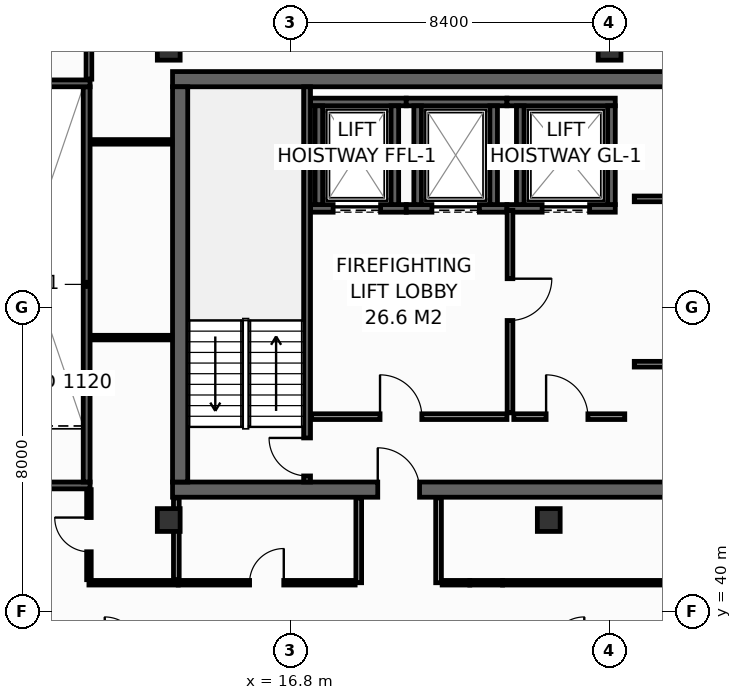
"""IFC4 building model, lengths in metres.
Left out: names, types, materials, properties, quantities, classifications, styles, units other than length and angle.
Written with IfcOpenShell. Run it as: python <this file> out.ifc"""

import sys

from ifc_helpers import new_model, si_unit, direction, frame, frame_2d, origin, origin_2d, place, context, subcontext, project, spatial, rectangle, hollow_rectangle, extrude, element, fill, save


model = new_model("IFC4")
c1 = context("Model", 3, precision=1e-05, world=origin(), true_north=direction((0.0, 1.0)))
c2 = subcontext(c1, "Body", "Model", "MODEL_VIEW")
j1 = project(units=[si_unit("LENGTHUNIT", "METRE"), si_unit("PLANEANGLEUNIT", "RADIAN")], contexts=[c1])
p1 = place(None, origin())
s1 = spatial("IfcSite", under=j1, at=p1, CompositionType="ELEMENT")
p2 = place(p1, origin())
s2 = spatial("IfcBuilding", under=s1, at=p2, CompositionType="ELEMENT")
p3 = place(p2, frame((0.0, 0.0, 272.4)))
s3 = spatial("IfcBuildingStorey", under=s2, at=p3, CompositionType="ELEMENT", Elevation=272.4)
p4 = place(p3, frame((13.7, 43.2, 0.0), z_axis=(0.0, 0.0, 1.0), x_axis=(1.0, 0.0, 0.0)))
e1 = element("IfcWall", 1, at=p4, inside=s3, PredefinedType="SHEAR", context=c2, shape_type="SweptSolid", body=[
    extrude(rectangle(XDim=32.5, YDim=0.4, at=frame_2d((16.25, 0.0))), origin(), (0.0, 0.0, 1.0), 3.35),
])
p5 = place(p4, frame((5.4, 0.0, 0.0)))
e2 = element("IfcOpeningElement", 2, at=p5, cuts=e1, PredefinedType="OPENING", context=c2, shape_type="SweptSolid", body=[
    extrude(rectangle(XDim=1.1, YDim=2.15, at=frame_2d((0.55, 1.075))), frame((0.0, 0.21, 0.0), z_axis=(0.0, -1.0, 0.0), x_axis=(1.0, 0.0, 0.0)), (0.0, 0.0, 1.0), 0.42),
])
p6 = place(p4, frame((25.6, 0.0, 0.0)))
e3 = element("IfcOpeningElement", 3, at=p6, cuts=e1, PredefinedType="OPENING", context=c2, shape_type="SweptSolid", body=[
    extrude(rectangle(XDim=1.1, YDim=2.15, at=frame_2d((0.55, 1.075))), frame((0.0, 0.21, 0.0), z_axis=(0.0, -1.0, 0.0), x_axis=(1.0, 0.0, 0.0)), (0.0, 0.0, 1.0), 0.42),
])
p7 = place(p3, frame((13.7, 54.0, 0.0), z_axis=(0.0, 0.0, 1.0), x_axis=(1.0, 0.0, 0.0)))
e4 = element("IfcWall", 4, at=p7, inside=s3, PredefinedType="SHEAR", context=c2, shape_type="SweptSolid", body=[
    extrude(rectangle(XDim=32.5, YDim=0.4, at=frame_2d((16.25, 0.0))), origin(), (0.0, 0.0, 1.0), 3.35),
])
p8 = place(p3, frame((13.9, 43.4, 0.0), z_axis=(0.0, 0.0, 1.0), x_axis=(0.0, 1.0, 0.0)))
e5 = element("IfcWall", 5, at=p8, inside=s3, PredefinedType="SHEAR", context=c2, shape_type="SweptSolid", body=[
    extrude(rectangle(XDim=10.4, YDim=0.4, at=frame_2d((5.2, 0.0))), origin(), (0.0, 0.0, 1.0), 3.35),
])
for number, where, z_axis, x_axis in (
    (6, (13.6, 54.8, 0.0), (0.0, 0.0, 1.0), (1.0, 0.0, 0.0)),
    (7, (25.2, 54.8, 0.0), (0.0, 0.0, 1.0), (1.0, 0.0, 0.0)),
    (8, (13.6, 42.4, 0.0), (0.0, 0.0, 1.0), (1.0, 0.0, 0.0)),
    (9, (23.6, 42.4, 0.0), (0.0, 0.0, 1.0), (1.0, 0.0, 0.0)),
):
    element("IfcColumn", number, at=place(p3, frame(where, z_axis=z_axis, x_axis=x_axis)), inside=s3, PredefinedType="COLUMN", context=c2, shape_type="SweptSolid", body=[
        extrude(hollow_rectangle(XDim=0.6, YDim=0.6, WallThickness=0.028, at=origin_2d()), origin(), (0.0, 0.0, 1.0), 3.8),
    ])
p9 = place(p3, frame((17.33, 50.6, 0.0), z_axis=(0.0, 0.0, 1.0), x_axis=(1.0, 0.0, 0.0)))
e10 = element("IfcWall", 10, at=p9, inside=s3, PredefinedType="SHEAR", context=c2, shape_type="SweptSolid", body=[
    extrude(rectangle(XDim=2.52, YDim=0.2, at=frame_2d((1.26, 0.0))), origin(), (0.0, 0.0, 1.0), 3.35),
])
p10 = place(p9, frame((0.595, 0.0, 0.0)))
e11 = element("IfcOpeningElement", 11, at=p10, cuts=e10, PredefinedType="OPENING", context=c2, shape_type="SweptSolid", body=[
    extrude(rectangle(XDim=1.25, YDim=2.3, at=frame_2d((0.625, 1.15))), frame((0.0, 0.11, 0.0), z_axis=(0.0, -1.0, 0.0), x_axis=(1.0, 0.0, 0.0)), (0.0, 0.0, 1.0), 0.22),
])
p11 = place(p3, frame((17.33, 53.4, 0.0), z_axis=(0.0, 0.0, 1.0), x_axis=(1.0, 0.0, 0.0)))
e12 = element("IfcWall", 12, at=p11, inside=s3, PredefinedType="SHEAR", context=c2, shape_type="SweptSolid", body=[
    extrude(rectangle(XDim=2.52, YDim=0.2, at=frame_2d((1.26, 0.0))), origin(), (0.0, 0.0, 1.0), 3.35),
])
for number, where, z_axis, x_axis in (
    (13, (17.55, 50.7, 0.0), (0.0, 0.0, 1.0), (0.0, 1.0, 0.0)),
    (14, (19.55, 50.7, 0.0), (0.0, 0.0, 1.0), (0.0, 1.0, 0.0)),
):
    element("IfcWall", number, at=place(p3, frame(where, z_axis=z_axis, x_axis=x_axis)), inside=s3, PredefinedType="SHEAR", context=c2, shape_type="SweptSolid", body=[
        extrude(rectangle(XDim=2.6, YDim=0.2, at=frame_2d((1.3, 0.0))), origin(), (0.0, 0.0, 1.0), 3.35),
    ])
p12 = place(p3, frame((19.85, 50.6, 0.0), z_axis=(0.0, 0.0, 1.0), x_axis=(1.0, 0.0, 0.0)))
e15 = element("IfcWall", 15, at=p12, inside=s3, PredefinedType="SHEAR", context=c2, shape_type="SweptSolid", body=[
    extrude(rectangle(XDim=2.65, YDim=0.2, at=frame_2d((1.325, 0.0))), origin(), (0.0, 0.0, 1.0), 3.35),
])
p13 = place(p12, frame((0.675, 0.0, 0.0)))
e16 = element("IfcOpeningElement", 16, at=p13, cuts=e15, PredefinedType="OPENING", context=c2, shape_type="SweptSolid", body=[
    extrude(rectangle(XDim=1.25, YDim=2.3, at=frame_2d((0.625, 1.15))), frame((0.0, 0.11, 0.0), z_axis=(0.0, -1.0, 0.0), x_axis=(1.0, 0.0, 0.0)), (0.0, 0.0, 1.0), 0.22),
])
p14 = place(p3, frame((19.85, 53.4, 0.0), z_axis=(0.0, 0.0, 1.0), x_axis=(1.0, 0.0, 0.0)))
e17 = element("IfcWall", 17, at=p14, inside=s3, PredefinedType="SHEAR", context=c2, shape_type="SweptSolid", body=[
    extrude(rectangle(XDim=2.65, YDim=0.2, at=frame_2d((1.325, 0.0))), origin(), (0.0, 0.0, 1.0), 3.35),
])
for number, where, z_axis, x_axis in (
    (18, (20.15, 50.7, 0.0), (0.0, 0.0, 1.0), (0.0, 1.0, 0.0)),
    (19, (22.15, 50.7, 0.0), (0.0, 0.0, 1.0), (0.0, 1.0, 0.0)),
):
    element("IfcWall", number, at=place(p3, frame(where, z_axis=z_axis, x_axis=x_axis)), inside=s3, PredefinedType="SHEAR", context=c2, shape_type="SweptSolid", body=[
        extrude(rectangle(XDim=2.6, YDim=0.2, at=frame_2d((1.3, 0.0))), origin(), (0.0, 0.0, 1.0), 3.35),
    ])
p15 = place(p3, frame((22.5, 50.6, 0.0), z_axis=(0.0, 0.0, 1.0), x_axis=(1.0, 0.0, 0.0)))
e20 = element("IfcWall", 20, at=p15, inside=s3, PredefinedType="SHEAR", context=c2, shape_type="SweptSolid", body=[
    extrude(rectangle(XDim=2.85, YDim=0.2, at=frame_2d((1.425, 0.0))), origin(), (0.0, 0.0, 1.0), 3.35),
])
p16 = place(p15, frame((0.925, 0.0, 0.0)))
e21 = element("IfcOpeningElement", 21, at=p16, cuts=e20, PredefinedType="OPENING", context=c2, shape_type="SweptSolid", body=[
    extrude(rectangle(XDim=1.25, YDim=2.3, at=frame_2d((0.625, 1.15))), frame((0.0, 0.11, 0.0), z_axis=(0.0, -1.0, 0.0), x_axis=(1.0, 0.0, 0.0)), (0.0, 0.0, 1.0), 0.22),
])
p17 = place(p3, frame((22.5, 53.4, 0.0), z_axis=(0.0, 0.0, 1.0), x_axis=(1.0, 0.0, 0.0)))
e22 = element("IfcWall", 22, at=p17, inside=s3, PredefinedType="SHEAR", context=c2, shape_type="SweptSolid", body=[
    extrude(rectangle(XDim=2.85, YDim=0.2, at=frame_2d((1.425, 0.0))), origin(), (0.0, 0.0, 1.0), 3.35),
])
for number, where, z_axis, x_axis in (
    (23, (22.85, 50.7, 0.0), (0.0, 0.0, 1.0), (0.0, 1.0, 0.0)),
    (24, (25.25, 50.7, 0.0), (0.0, 0.0, 1.0), (0.0, 1.0, 0.0)),
):
    element("IfcWall", number, at=place(p3, frame(where, z_axis=z_axis, x_axis=x_axis)), inside=s3, PredefinedType="SHEAR", context=c2, shape_type="SweptSolid", body=[
        extrude(rectangle(XDim=2.6, YDim=0.2, at=frame_2d((1.3, 0.0))), origin(), (0.0, 0.0, 1.0), 3.35),
    ])
p18 = place(p3, frame((17.24, 43.4, 0.0), z_axis=(0.0, 0.0, 1.0), x_axis=(0.0, 1.0, 0.0)))
e25 = element("IfcWall", 25, at=p18, inside=s3, PredefinedType="SHEAR", context=c2, shape_type="SweptSolid", body=[
    extrude(rectangle(XDim=10.4, YDim=0.18, at=frame_2d((5.2, 0.0))), origin(), (0.0, 0.0, 1.0), 3.35),
])
p19 = place(p18, frame((0.16, 0.0, 0.0)))
e26 = element("IfcOpeningElement", 26, at=p19, cuts=e25, PredefinedType="OPENING", context=c2, shape_type="SweptSolid", body=[
    extrude(rectangle(XDim=1.0, YDim=2.15, at=frame_2d((0.5, 1.075))), frame((0.0, 0.1, 0.0), z_axis=(0.0, -1.0, 0.0), x_axis=(1.0, 0.0, 0.0)), (0.0, 0.0, 1.0), 0.2),
])
p20 = place(p3, frame((8.12, 43.31, 0.0), z_axis=(0.0, 0.0, 1.0), x_axis=(1.0, 0.0, 0.0)))
e27 = element("IfcWall", 27, at=p20, inside=s3, PredefinedType="SHEAR", context=c2, shape_type="SweptSolid", body=[
    extrude(rectangle(XDim=3.41, YDim=0.18, at=frame_2d((1.705, 0.0))), origin(), (0.0, 0.0, 1.0), 3.35),
])
p21 = place(p20, frame((1.15, 0.0, 0.0)))
e28 = element("IfcOpeningElement", 28, at=p21, cuts=e27, PredefinedType="OPENING", context=c2, shape_type="SweptSolid", body=[
    extrude(rectangle(XDim=1.1, YDim=2.15, at=frame_2d((0.55, 1.075))), frame((0.0, 0.1, 0.0), z_axis=(0.0, -1.0, 0.0), x_axis=(1.0, 0.0, 0.0)), (0.0, 0.0, 1.0), 0.2),
])
p22 = place(p3, frame((11.44, 43.4, 0.0), z_axis=(0.0, 0.0, 1.0), x_axis=(0.0, 1.0, 0.0)))
e29 = element("IfcWall", 29, at=p22, inside=s3, PredefinedType="SHEAR", context=c2, shape_type="SweptSolid", body=[
    extrude(rectangle(XDim=10.4, YDim=0.18, at=frame_2d((5.2, 0.0))), origin(), (0.0, 0.0, 1.0), 3.35),
])
p23 = place(p3, frame((11.53, 53.89, 0.0), z_axis=(0.0, 0.0, 1.0), x_axis=(-1.0, 0.0, 0.0)))
e30 = element("IfcWall", 30, at=p23, inside=s3, PredefinedType="SHEAR", context=c2, shape_type="SweptSolid", body=[
    extrude(rectangle(XDim=3.41, YDim=0.18, at=frame_2d((1.705, 0.0))), origin(), (0.0, 0.0, 1.0), 3.35),
])
p24 = place(p3, frame((17.36, 45.12, 0.0), z_axis=(0.0, 0.0, 1.0), x_axis=(1.0, 0.0, 0.0)))
e31 = element("IfcWall", 31, at=p24, inside=s3, PredefinedType="PARTITIONING", context=c2, shape_type="SweptSolid", body=[
    extrude(rectangle(XDim=5.14, YDim=0.15, at=frame_2d((2.57, 0.0))), origin(), (0.0, 0.0, 1.0), 3.35),
])
p25 = place(p24, frame((1.8, 0.0, 0.0)))
e32 = element("IfcOpeningElement", 32, at=p25, cuts=e31, PredefinedType="OPENING", context=c2, shape_type="SweptSolid", body=[
    extrude(rectangle(XDim=1.1, YDim=2.15, at=frame_2d((0.55, 1.075))), frame((0.0, 0.085, 0.0), z_axis=(0.0, -1.0, 0.0), x_axis=(1.0, 0.0, 0.0)), (0.0, 0.0, 1.0), 0.17),
])
p26 = place(p3, frame((22.58, 50.55, 0.0), z_axis=(0.0, 0.0, 1.0), x_axis=(0.0, -1.0, 0.0)))
e33 = element("IfcWall", 33, at=p26, inside=s3, PredefinedType="PARTITIONING", context=c2, shape_type="SweptSolid", body=[
    extrude(rectangle(XDim=5.33, YDim=0.15, at=frame_2d((2.665, 0.0))), origin(), (0.0, 0.0, 1.0), 3.35),
])
p27 = place(p26, frame((1.8, 0.0, 0.0)))
e34 = element("IfcOpeningElement", 34, at=p27, cuts=e33, PredefinedType="OPENING", context=c2, shape_type="SweptSolid", body=[
    extrude(rectangle(XDim=1.1, YDim=2.15, at=frame_2d((0.55, 1.075))), frame((0.0, 0.085, 0.0), z_axis=(0.0, -1.0, 0.0), x_axis=(1.0, 0.0, 0.0)), (0.0, 0.0, 1.0), 0.17),
])
p28 = place(p3, frame((22.68, 45.12, 0.0), z_axis=(0.0, 0.0, 1.0), x_axis=(1.0, 0.0, 0.0)))
e35 = element("IfcWall", 35, at=p28, inside=s3, PredefinedType="PARTITIONING", context=c2, shape_type="SweptSolid", body=[
    extrude(rectangle(XDim=2.92, YDim=0.15, at=frame_2d((1.46, 0.0))), origin(), (0.0, 0.0, 1.0), 3.35),
])
p29 = place(p28, frame((0.85, 0.0, 0.0)))
e36 = element("IfcOpeningElement", 36, at=p29, cuts=e35, PredefinedType="OPENING", context=c2, shape_type="SweptSolid", body=[
    extrude(rectangle(XDim=1.1, YDim=2.15, at=frame_2d((0.55, 1.075))), frame((0.0, 0.085, 0.0), z_axis=(0.0, -1.0, 0.0), x_axis=(1.0, 0.0, 0.0)), (0.0, 0.0, 1.0), 0.17),
])
p30 = place(p3, frame((25.85, 50.85, 0.0), z_axis=(0.0, 0.0, 1.0), x_axis=(1.0, 0.0, 0.0)))
e37 = element("IfcWall", 37, at=p30, inside=s3, PredefinedType="PARTITIONING", context=c2, shape_type="SweptSolid", body=[
    extrude(rectangle(XDim=7.65, YDim=0.15, at=frame_2d((3.825, 0.0))), origin(), (0.0, 0.0, 1.0), 3.35),
])
p31 = place(p30, frame((1.25, 0.0, 0.0)))
e38 = element("IfcOpeningElement", 38, at=p31, cuts=e37, PredefinedType="OPENING", context=c2, shape_type="SweptSolid", body=[
    extrude(rectangle(XDim=0.95, YDim=2.15, at=frame_2d((0.475, 1.075))), frame((0.0, 0.085, 0.0), z_axis=(0.0, -1.0, 0.0), x_axis=(1.0, 0.0, 0.0)), (0.0, 0.0, 1.0), 0.17),
])
p32 = place(p30, frame((5.05, 0.0, 0.0)))
e39 = element("IfcOpeningElement", 39, at=p32, cuts=e37, PredefinedType="OPENING", context=c2, shape_type="SweptSolid", body=[
    extrude(rectangle(XDim=0.95, YDim=2.15, at=frame_2d((0.475, 1.075))), frame((0.0, 0.085, 0.0), z_axis=(0.0, -1.0, 0.0), x_axis=(1.0, 0.0, 0.0)), (0.0, 0.0, 1.0), 0.17),
])
p33 = place(p3, frame((25.85, 46.5, 0.0), z_axis=(0.0, 0.0, 1.0), x_axis=(1.0, 0.0, 0.0)))
e40 = element("IfcWall", 40, at=p33, inside=s3, PredefinedType="PARTITIONING", context=c2, shape_type="SweptSolid", body=[
    extrude(rectangle(XDim=7.65, YDim=0.15, at=frame_2d((3.825, 0.0))), origin(), (0.0, 0.0, 1.0), 3.35),
])
p34 = place(p33, frame((2.8, 0.0, 0.0)))
e41 = element("IfcOpeningElement", 41, at=p34, cuts=e40, PredefinedType="OPENING", context=c2, shape_type="SweptSolid", body=[
    extrude(rectangle(XDim=0.95, YDim=2.15, at=frame_2d((0.475, 1.075))), frame((0.0, 0.085, 0.0), z_axis=(0.0, -1.0, 0.0), x_axis=(1.0, 0.0, 0.0)), (0.0, 0.0, 1.0), 0.17),
])
p35 = place(p3, frame((11.5, 40.75, 0.0), z_axis=(0.0, 0.0, 1.0), x_axis=(1.0, 0.0, 0.0)))
e42 = element("IfcWall", 42, at=p35, inside=s3, PredefinedType="PARTITIONING", context=c2, shape_type="SweptSolid", body=[
    extrude(rectangle(XDim=2.35, YDim=0.12, at=frame_2d((1.175, 0.0))), origin(), (0.0, 0.0, 1.0), 3.35),
])
p36 = place(p3, frame((11.55, 52.35, 0.0), z_axis=(0.0, 0.0, 1.0), x_axis=(1.0, 0.0, 0.0)))
e43 = element("IfcWall", 43, at=p36, inside=s3, PredefinedType="PARTITIONING", context=c2, shape_type="SweptSolid", body=[
    extrude(rectangle(XDim=2.13, YDim=0.12, at=frame_2d((1.065, 0.0))), origin(), (0.0, 0.0, 1.0), 3.35),
])
p37 = place(p3, frame((11.5, 54.0, 0.0), z_axis=(0.0, 0.0, 1.0), x_axis=(0.0, 1.0, 0.0)))
e44 = element("IfcWall", 44, at=p37, inside=s3, PredefinedType="PARTITIONING", context=c2, shape_type="SweptSolid", body=[
    extrude(rectangle(XDim=1.995, YDim=0.15, at=frame_2d((0.998, 0.0))), origin(), (0.0, 0.0, 1.0), 2.735),
])
p38 = place(p3, frame((11.55, 47.2, 0.0), z_axis=(0.0, 0.0, 1.0), x_axis=(1.0, 0.0, 0.0)))
e45 = element("IfcWall", 45, at=p38, inside=s3, PredefinedType="PARTITIONING", context=c2, shape_type="SweptSolid", body=[
    extrude(rectangle(XDim=2.13, YDim=0.12, at=frame_2d((1.065, 0.0))), origin(), (0.0, 0.0, 1.0), 3.35),
])
p39 = place(p3, frame((11.5, 40.83, 0.0), z_axis=(0.0, 0.0, 1.0), x_axis=(0.0, 1.0, 0.0)))
e46 = element("IfcWall", 46, at=p39, inside=s3, PredefinedType="PARTITIONING", context=c2, shape_type="SweptSolid", body=[
    extrude(rectangle(XDim=2.37, YDim=0.12, at=frame_2d((1.185, 0.0))), origin(), (0.0, 0.0, 1.0), 2.747),
])
p40 = place(p39, frame((0.735, 0.0, 0.0)))
e47 = element("IfcOpeningElement", 47, at=p40, cuts=e46, PredefinedType="OPENING", context=c2, shape_type="SweptSolid", body=[
    extrude(rectangle(XDim=0.9, YDim=2.1, at=frame_2d((0.45, 1.05))), frame((0.0, 0.07, 0.0), z_axis=(0.0, -1.0, 0.0), x_axis=(1.0, 0.0, 0.0)), (0.0, 0.0, 1.0), 0.14),
])
p41 = place(p3, frame((13.8, 40.83, 0.0), z_axis=(0.0, 0.0, 1.0), x_axis=(0.0, 1.0, 0.0)))
e48 = element("IfcWall", 48, at=p41, inside=s3, PredefinedType="PARTITIONING", context=c2, shape_type="SweptSolid", body=[
    extrude(rectangle(XDim=2.15, YDim=0.15, at=frame_2d((1.075, 0.0))), origin(), (0.0, 0.0, 1.0), 3.35),
])
for number, where, z_axis, x_axis in (
    (49, (18.6, 40.75, 0.0), (0.0, 0.0, 1.0), (0.0, 1.0, 0.0)),
    (50, (20.7, 40.75, 0.0), (0.0, 0.0, 1.0), (0.0, 1.0, 0.0)),
):
    element("IfcWall", number, at=place(p3, frame(where, z_axis=z_axis, x_axis=x_axis)), inside=s3, PredefinedType="PARTITIONING", context=c2, shape_type="SweptSolid", body=[
        extrude(rectangle(XDim=2.23, YDim=0.15, at=frame_2d((1.115, 0.0))), origin(), (0.0, 0.0, 1.0), 3.35),
    ])
p42 = place(p3, frame((13.85, 40.75, 0.0), z_axis=(0.0, 0.0, 1.0), x_axis=(1.0, 0.0, 0.0)))
e51 = element("IfcWall", 51, at=p42, inside=s3, PredefinedType="PARTITIONING", context=c2, shape_type="SweptSolid", body=[
    extrude(rectangle(XDim=4.655, YDim=0.12, at=frame_2d((2.327, 0.0))), origin(), (0.0, 0.0, 1.0), 3.35),
])
p43 = place(p42, frame((1.877, 0.0, 0.0)))
e52 = element("IfcOpeningElement", 52, at=p43, cuts=e51, PredefinedType="OPENING", context=c2, shape_type="SweptSolid", body=[
    extrude(rectangle(XDim=0.9, YDim=2.1, at=frame_2d((0.45, 1.05))), frame((0.0, 0.07, 0.0), z_axis=(0.0, -1.0, 0.0), x_axis=(1.0, 0.0, 0.0)), (0.0, 0.0, 1.0), 0.14),
])
p44 = place(p3, frame((22.384, 40.75, 0.0), z_axis=(0.0, 0.0, 1.0), x_axis=(1.0, 0.0, 0.0)))
e53 = element("IfcWall", 53, at=p44, inside=s3, PredefinedType="PARTITIONING", context=c2, shape_type="SweptSolid", body=[
    extrude(rectangle(XDim=15.232, YDim=0.12, at=frame_2d((7.616, 0.0))), origin(), (0.0, 0.0, 1.0), 3.35),
])
p45 = place(p44, frame((7.166, 0.0, 0.0)))
e54 = element("IfcOpeningElement", 54, at=p45, cuts=e53, PredefinedType="OPENING", context=c2, shape_type="SweptSolid", body=[
    extrude(rectangle(XDim=0.9, YDim=2.1, at=frame_2d((0.45, 1.05))), frame((0.0, 0.07, 0.0), z_axis=(0.0, -1.0, 0.0), x_axis=(1.0, 0.0, 0.0)), (0.0, 0.0, 1.0), 0.14),
])
p46 = place(p3, frame((20.795, 40.75, 0.0), z_axis=(0.0, 0.0, 1.0), x_axis=(1.0, 0.0, 0.0)))
e55 = element("IfcWall", 55, at=p46, inside=s3, PredefinedType="PARTITIONING", context=c2, shape_type="SweptSolid", body=[
    extrude(rectangle(XDim=0.727, YDim=0.12, at=frame_2d((0.363, 0.0))), origin(), (0.0, 0.0, 1.0), 3.35),
])
p47 = place(p3, frame((21.522, 40.75, 0.0), z_axis=(0.0, 0.0, 1.0), x_axis=(1.0, 0.0, 0.0)))
e56 = element("IfcWall", 56, at=p47, inside=s3, PredefinedType="PARTITIONING", context=c2, shape_type="SweptSolid", body=[
    extrude(rectangle(XDim=0.862, YDim=0.12, at=frame_2d((0.431, 0.0))), origin(), (0.0, 0.0, 1.0), 1.935),
])
p48 = place(p10, origin())
e57 = element("IfcDoor", 57, at=p48, inside=s3, OperationType="SLIDING_TO_LEFT", PredefinedType="DOOR", context=c2, shape_type="SweptSolid", body=[
    extrude(rectangle(XDim=1.25, YDim=2.3, at=frame_2d((0.625, 1.15))), frame((0.0, 0.025, 0.0), z_axis=(0.0, -1.0, 0.0), x_axis=(1.0, 0.0, 0.0)), (0.0, 0.0, 1.0), 0.05),
])
fill(e11, e57)
p49 = place(p13, origin())
e58 = element("IfcDoor", 58, at=p49, inside=s3, OperationType="SLIDING_TO_LEFT", PredefinedType="DOOR", context=c2, shape_type="SweptSolid", body=[
    extrude(rectangle(XDim=1.25, YDim=2.3, at=frame_2d((0.625, 1.15))), frame((0.0, 0.025, 0.0), z_axis=(0.0, -1.0, 0.0), x_axis=(1.0, 0.0, 0.0)), (0.0, 0.0, 1.0), 0.05),
])
fill(e16, e58)
p50 = place(p16, origin())
e59 = element("IfcDoor", 59, at=p50, inside=s3, OperationType="SLIDING_TO_LEFT", PredefinedType="DOOR", context=c2, shape_type="SweptSolid", body=[
    extrude(rectangle(XDim=1.25, YDim=2.3, at=frame_2d((0.625, 1.15))), frame((0.0, 0.025, 0.0), z_axis=(0.0, -1.0, 0.0), x_axis=(1.0, 0.0, 0.0)), (0.0, 0.0, 1.0), 0.05),
])
fill(e21, e59)
p51 = place(p19, origin())
e60 = element("IfcDoor", 60, at=p51, inside=s3, OperationType="SINGLE_SWING_RIGHT", PredefinedType="DOOR", context=c2, shape_type="SweptSolid", body=[
    extrude(rectangle(XDim=1.0, YDim=2.15, at=frame_2d((0.5, 1.075))), frame((0.0, 0.025, 0.0), z_axis=(0.0, -1.0, 0.0), x_axis=(1.0, 0.0, 0.0)), (0.0, 0.0, 1.0), 0.05),
])
fill(e26, e60)
p52 = place(p25, origin())
e61 = element("IfcDoor", 61, at=p52, inside=s3, OperationType="SINGLE_SWING_LEFT", PredefinedType="DOOR", context=c2, shape_type="SweptSolid", body=[
    extrude(rectangle(XDim=1.1, YDim=2.15, at=frame_2d((0.55, 1.075))), frame((0.0, 0.025, 0.0), z_axis=(0.0, -1.0, 0.0), x_axis=(1.0, 0.0, 0.0)), (0.0, 0.0, 1.0), 0.05),
])
fill(e32, e61)
p53 = place(p27, origin())
e62 = element("IfcDoor", 62, at=p53, inside=s3, OperationType="SINGLE_SWING_LEFT", PredefinedType="DOOR", context=c2, shape_type="SweptSolid", body=[
    extrude(rectangle(XDim=1.1, YDim=2.15, at=frame_2d((0.55, 1.075))), frame((0.0, 0.025, 0.0), z_axis=(0.0, -1.0, 0.0), x_axis=(1.0, 0.0, 0.0)), (0.0, 0.0, 1.0), 0.05),
])
fill(e34, e62)
p54 = place(p29, origin())
e63 = element("IfcDoor", 63, at=p54, inside=s3, OperationType="SINGLE_SWING_LEFT", PredefinedType="DOOR", context=c2, shape_type="SweptSolid", body=[
    extrude(rectangle(XDim=1.1, YDim=2.15, at=frame_2d((0.55, 1.075))), frame((0.0, 0.025, 0.0), z_axis=(0.0, -1.0, 0.0), x_axis=(1.0, 0.0, 0.0)), (0.0, 0.0, 1.0), 0.05),
])
fill(e36, e63)
p55 = place(p5, origin())
e64 = element("IfcDoor", 64, at=p55, inside=s3, OperationType="SINGLE_SWING_LEFT", PredefinedType="DOOR", context=c2, shape_type="SweptSolid", body=[
    extrude(rectangle(XDim=1.1, YDim=2.15, at=frame_2d((0.55, 1.075))), frame((0.0, 0.025, 0.0), z_axis=(0.0, -1.0, 0.0), x_axis=(1.0, 0.0, 0.0)), (0.0, 0.0, 1.0), 0.05),
])
fill(e2, e64)
p56 = place(p40, origin())
e65 = element("IfcDoor", 65, at=p56, inside=s3, OperationType="SINGLE_SWING_RIGHT", PredefinedType="DOOR", context=c2, shape_type="SweptSolid", body=[
    extrude(rectangle(XDim=0.9, YDim=2.1, at=frame_2d((0.45, 1.05))), frame((0.0, 0.025, 0.0), z_axis=(0.0, -1.0, 0.0), x_axis=(1.0, 0.0, 0.0)), (0.0, 0.0, 1.0), 0.05),
])
fill(e47, e65)
p57 = place(p43, origin())
e66 = element("IfcDoor", 66, at=p57, inside=s3, OperationType="SINGLE_SWING_RIGHT", PredefinedType="DOOR", context=c2, shape_type="SweptSolid", body=[
    extrude(rectangle(XDim=0.9, YDim=2.1, at=frame_2d((0.45, 1.05))), frame((0.0, 0.025, 0.0), z_axis=(0.0, -1.0, 0.0), x_axis=(1.0, 0.0, 0.0)), (0.0, 0.0, 1.0), 0.05),
])
fill(e52, e66)
save(model, sys.argv[1])
